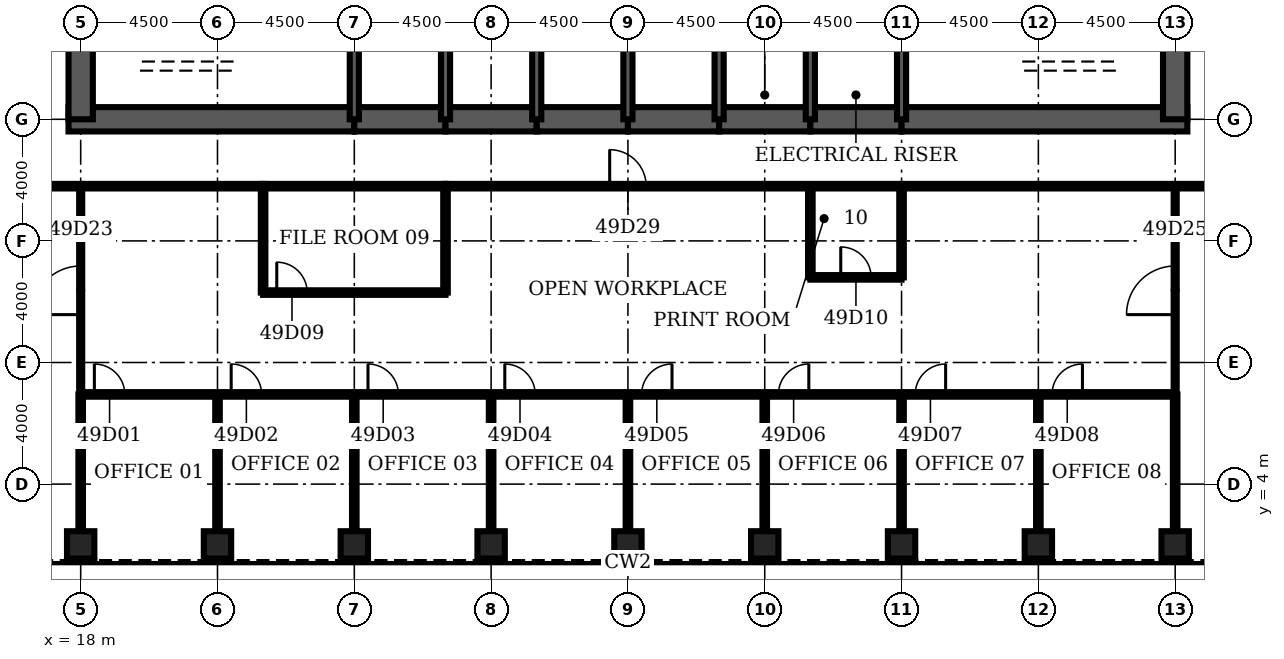
"""IFC4 building model, lengths in metres.
Left out: names, types, materials, properties, quantities, classifications, styles, units other than length and angle.
Written with IfcOpenShell. Run it as: python <this file> out.ifc"""

import sys

from ifc_helpers import new_model, si_unit, direction, frame, frame_2d, origin, origin_2d, place, context, subcontext, project, spatial, rectangle, hollow_rectangle, extrude, element, fill, save


model = new_model("IFC4")
c1 = context("Model", 3, precision=1e-05, world=origin(), true_north=direction((0.0, 1.0)))
c2 = subcontext(c1, "Body", "Model", "MODEL_VIEW")
j1 = project(units=[si_unit("LENGTHUNIT", "METRE"), si_unit("PLANEANGLEUNIT", "RADIAN")], contexts=[c1])
p1 = place(None, origin())
s1 = spatial("IfcSite", under=j1, at=p1, CompositionType="ELEMENT")
p2 = place(p1, origin())
s2 = spatial("IfcBuilding", under=s1, at=p2, CompositionType="ELEMENT")
p3 = place(p2, frame((0.0, 0.0, 219.4)))
s3 = spatial("IfcBuildingStorey", under=s2, at=p3, CompositionType="ELEMENT", Elevation=219.4)
for number, where, z_axis, x_axis in (
    (1, (18.0, 2.0, 0.0), (0.0, 0.0, 1.0), (0.0, 1.0, 0.0)),
    (2, (22.5, 2.0, 0.0), (0.0, 0.0, 1.0), (0.0, 1.0, 0.0)),
    (3, (27.0, 2.0, 0.0), (0.0, 0.0, 1.0), (0.0, 1.0, 0.0)),
    (4, (31.5, 2.0, 0.0), (0.0, 0.0, 1.0), (0.0, 1.0, 0.0)),
    (5, (36.0, 2.0, 0.0), (0.0, 0.0, 1.0), (0.0, 1.0, 0.0)),
    (6, (40.5, 2.0, 0.0), (0.0, 0.0, 1.0), (0.0, 1.0, 0.0)),
    (7, (45.0, 2.0, 0.0), (0.0, 0.0, 1.0), (0.0, 1.0, 0.0)),
    (8, (49.5, 2.0, 0.0), (0.0, 0.0, 1.0), (0.0, 1.0, 0.0)),
    (9, (54.0, 2.0, 0.0), (0.0, 0.0, 1.0), (0.0, 1.0, 0.0)),
):
    element("IfcColumn", number, at=place(p3, frame(where, z_axis=z_axis, x_axis=x_axis)), inside=s3, PredefinedType="COLUMN", context=c2, shape_type="SweptSolid", body=[
        extrude(hollow_rectangle(XDim=0.9, YDim=0.9, WallThickness=0.08, at=origin_2d()), origin(), (0.0, 0.0, 1.0), 4.2),
    ])
p4 = place(p3, frame((17.6, 16.0, 0.0), z_axis=(0.0, 0.0, 1.0), x_axis=(1.0, 0.0, 0.0)))
e10 = element("IfcWall", 10, at=p4, inside=s3, PredefinedType="SHEAR", context=c2, shape_type="SweptSolid", body=[
    extrude(rectangle(XDim=9.4, YDim=0.8, at=frame_2d((4.7, 0.0))), origin(), (0.0, 0.0, 1.0), 4.2),
])
for number, where, z_axis, x_axis in (
    (11, (27.0, 16.0, 0.0), (0.0, 0.0, 1.0), (1.0, 0.0, 0.0)),
    (12, (30.0, 16.0, 0.0), (0.0, 0.0, 1.0), (1.0, 0.0, 0.0)),
    (13, (33.0, 16.0, 0.0), (0.0, 0.0, 1.0), (1.0, 0.0, 0.0)),
    (14, (36.0, 16.0, 0.0), (0.0, 0.0, 1.0), (1.0, 0.0, 0.0)),
    (15, (39.0, 16.0, 0.0), (0.0, 0.0, 1.0), (1.0, 0.0, 0.0)),
    (16, (42.0, 16.0, 0.0), (0.0, 0.0, 1.0), (1.0, 0.0, 0.0)),
):
    element("IfcWall", number, at=place(p3, frame(where, z_axis=z_axis, x_axis=x_axis)), inside=s3, PredefinedType="SHEAR", context=c2, shape_type="SweptSolid", body=[
        extrude(rectangle(XDim=3.0, YDim=0.8, at=frame_2d((1.5, 0.0))), origin(), (0.0, 0.0, 1.0), 4.2),
    ])
p5 = place(p3, frame((45.0, 16.0, 0.0), z_axis=(0.0, 0.0, 1.0), x_axis=(1.0, 0.0, 0.0)))
e17 = element("IfcWall", 17, at=p5, inside=s3, PredefinedType="SHEAR", context=c2, shape_type="SweptSolid", body=[
    extrude(rectangle(XDim=9.4, YDim=0.8, at=frame_2d((4.7, 0.0))), origin(), (0.0, 0.0, 1.0), 4.2),
])
for number, where, z_axis, x_axis in (
    (18, (18.0, 19.2, 0.0), (0.0, 0.0, 1.0), (0.0, -1.0, 0.0)),
    (19, (54.0, 16.0, 0.0), (0.0, 0.0, 1.0), (0.0, 1.0, 0.0)),
):
    element("IfcWall", number, at=place(p3, frame(where, z_axis=z_axis, x_axis=x_axis)), inside=s3, PredefinedType="SHEAR", context=c2, shape_type="SweptSolid", body=[
        extrude(rectangle(XDim=3.2, YDim=0.8, at=frame_2d((1.6, 0.0))), origin(), (0.0, 0.0, 1.0), 4.2),
    ])
for number, where, z_axis, x_axis in (
    (20, (27.0, 16.0, 0.0), (0.0, 0.0, 1.0), (0.0, 1.0, 0.0)),
    (21, (30.0, 16.0, 0.0), (0.0, 0.0, 1.0), (0.0, 1.0, 0.0)),
    (22, (33.0, 16.0, 0.0), (0.0, 0.0, 1.0), (0.0, 1.0, 0.0)),
    (23, (36.0, 16.0, 0.0), (0.0, 0.0, 1.0), (0.0, 1.0, 0.0)),
    (24, (39.0, 16.0, 0.0), (0.0, 0.0, 1.0), (0.0, 1.0, 0.0)),
    (25, (42.0, 16.0, 0.0), (0.0, 0.0, 1.0), (0.0, 1.0, 0.0)),
    (26, (45.0, 16.0, 0.0), (0.0, 0.0, 1.0), (0.0, 1.0, 0.0)),
):
    element("IfcWall", number, at=place(p3, frame(where, z_axis=z_axis, x_axis=x_axis)), inside=s3, PredefinedType="SOLIDWALL", context=c2, shape_type="SweptSolid", body=[
        extrude(rectangle(XDim=3.2, YDim=0.3, at=frame_2d((1.6, 0.0))), origin(), (0.0, 0.0, 1.0), 4.2),
    ])
p6 = place(p3, frame((39.15, 17.35, 0.0), z_axis=(0.0, 0.0, 1.0), x_axis=(1.0, 0.0, 0.0)))
e27 = element("IfcWall", 27, at=p6, inside=s3, PredefinedType="SOLIDWALL", context=c2, shape_type="SweptSolid", body=[
    extrude(rectangle(XDim=2.7, YDim=0.3, at=frame_2d((1.35, 0.0))), origin(), (0.0, 0.0, 1.0), 4.04),
])
p7 = place(p6, frame((0.85, 0.0, 0.0)))
e28 = element("IfcOpeningElement", 28, at=p7, cuts=e27, PredefinedType="OPENING", context=c2, shape_type="SweptSolid", body=[
    extrude(rectangle(XDim=1.0, YDim=2.1, at=frame_2d((0.5, 1.05))), frame((0.0, 0.16, 0.0), z_axis=(0.0, -1.0, 0.0), x_axis=(1.0, 0.0, 0.0)), (0.0, 0.0, 1.0), 0.32),
])
p8 = place(p3, frame((42.15, 17.35, 0.0), z_axis=(0.0, 0.0, 1.0), x_axis=(1.0, 0.0, 0.0)))
e29 = element("IfcWall", 29, at=p8, inside=s3, PredefinedType="SOLIDWALL", context=c2, shape_type="SweptSolid", body=[
    extrude(rectangle(XDim=2.7, YDim=0.3, at=frame_2d((1.35, 0.0))), origin(), (0.0, 0.0, 1.0), 4.04),
])
p9 = place(p8, frame((0.85, 0.0, 0.0)))
e30 = element("IfcOpeningElement", 30, at=p9, cuts=e29, PredefinedType="OPENING", context=c2, shape_type="SweptSolid", body=[
    extrude(rectangle(XDim=1.0, YDim=2.1, at=frame_2d((0.5, 1.05))), frame((0.0, 0.16, 0.0), z_axis=(0.0, -1.0, 0.0), x_axis=(1.0, 0.0, 0.0)), (0.0, 0.0, 1.0), 0.32),
])
p10 = place(p3, frame((18.0, 6.95, 0.0), z_axis=(0.0, 0.0, 1.0), x_axis=(1.0, 0.0, 0.0)))
e31 = element("IfcWall", 31, at=p10, inside=s3, PredefinedType="PARTITIONING", context=c2, shape_type="SweptSolid", body=[
    extrude(rectangle(XDim=36.0, YDim=0.15, at=frame_2d((18.0, 0.0))), origin(), (0.0, 0.0, 1.0), 3.0),
])
p11 = place(p10, frame((0.45, 0.0, 0.0)))
e32 = element("IfcOpeningElement", 32, at=p11, cuts=e31, PredefinedType="OPENING", context=c2, shape_type="SweptSolid", body=[
    extrude(rectangle(XDim=1.0, YDim=2.1, at=frame_2d((0.5, 1.05))), frame((0.0, 0.085, 0.0), z_axis=(0.0, -1.0, 0.0), x_axis=(1.0, 0.0, 0.0)), (0.0, 0.0, 1.0), 0.17),
])
p12 = place(p10, frame((4.95, 0.0, 0.0)))
e33 = element("IfcOpeningElement", 33, at=p12, cuts=e31, PredefinedType="OPENING", context=c2, shape_type="SweptSolid", body=[
    extrude(rectangle(XDim=1.0, YDim=2.1, at=frame_2d((0.5, 1.05))), frame((0.0, 0.085, 0.0), z_axis=(0.0, -1.0, 0.0), x_axis=(1.0, 0.0, 0.0)), (0.0, 0.0, 1.0), 0.17),
])
p13 = place(p10, frame((9.45, 0.0, 0.0)))
e34 = element("IfcOpeningElement", 34, at=p13, cuts=e31, PredefinedType="OPENING", context=c2, shape_type="SweptSolid", body=[
    extrude(rectangle(XDim=1.0, YDim=2.1, at=frame_2d((0.5, 1.05))), frame((0.0, 0.085, 0.0), z_axis=(0.0, -1.0, 0.0), x_axis=(1.0, 0.0, 0.0)), (0.0, 0.0, 1.0), 0.17),
])
p14 = place(p10, frame((13.95, 0.0, 0.0)))
e35 = element("IfcOpeningElement", 35, at=p14, cuts=e31, PredefinedType="OPENING", context=c2, shape_type="SweptSolid", body=[
    extrude(rectangle(XDim=1.0, YDim=2.1, at=frame_2d((0.5, 1.05))), frame((0.0, 0.085, 0.0), z_axis=(0.0, -1.0, 0.0), x_axis=(1.0, 0.0, 0.0)), (0.0, 0.0, 1.0), 0.17),
])
p15 = place(p10, frame((18.45, 0.0, 0.0)))
e36 = element("IfcOpeningElement", 36, at=p15, cuts=e31, PredefinedType="OPENING", context=c2, shape_type="SweptSolid", body=[
    extrude(rectangle(XDim=1.0, YDim=2.1, at=frame_2d((0.5, 1.05))), frame((0.0, 0.085, 0.0), z_axis=(0.0, -1.0, 0.0), x_axis=(1.0, 0.0, 0.0)), (0.0, 0.0, 1.0), 0.17),
])
p16 = place(p10, frame((22.95, 0.0, 0.0)))
e37 = element("IfcOpeningElement", 37, at=p16, cuts=e31, PredefinedType="OPENING", context=c2, shape_type="SweptSolid", body=[
    extrude(rectangle(XDim=1.0, YDim=2.1, at=frame_2d((0.5, 1.05))), frame((0.0, 0.085, 0.0), z_axis=(0.0, -1.0, 0.0), x_axis=(1.0, 0.0, 0.0)), (0.0, 0.0, 1.0), 0.17),
])
p17 = place(p10, frame((27.45, 0.0, 0.0)))
e38 = element("IfcOpeningElement", 38, at=p17, cuts=e31, PredefinedType="OPENING", context=c2, shape_type="SweptSolid", body=[
    extrude(rectangle(XDim=1.0, YDim=2.1, at=frame_2d((0.5, 1.05))), frame((0.0, 0.085, 0.0), z_axis=(0.0, -1.0, 0.0), x_axis=(1.0, 0.0, 0.0)), (0.0, 0.0, 1.0), 0.17),
])
p18 = place(p10, frame((31.95, 0.0, 0.0)))
e39 = element("IfcOpeningElement", 39, at=p18, cuts=e31, PredefinedType="OPENING", context=c2, shape_type="SweptSolid", body=[
    extrude(rectangle(XDim=1.0, YDim=2.1, at=frame_2d((0.5, 1.05))), frame((0.0, 0.085, 0.0), z_axis=(0.0, -1.0, 0.0), x_axis=(1.0, 0.0, 0.0)), (0.0, 0.0, 1.0), 0.17),
])
p19 = place(p3, frame((24.0, 10.3, 0.0), z_axis=(0.0, 0.0, 1.0), x_axis=(1.0, 0.0, 0.0)))
e40 = element("IfcWall", 40, at=p19, inside=s3, PredefinedType="PARTITIONING", context=c2, shape_type="SweptSolid", body=[
    extrude(rectangle(XDim=6.0, YDim=0.15, at=frame_2d((3.0, 0.0))), origin(), (0.0, 0.0, 1.0), 3.0),
])
p20 = place(p19, frame((0.45, 0.0, 0.0)))
e41 = element("IfcOpeningElement", 41, at=p20, cuts=e40, PredefinedType="OPENING", context=c2, shape_type="SweptSolid", body=[
    extrude(rectangle(XDim=1.0, YDim=2.1, at=frame_2d((0.5, 1.05))), frame((0.0, 0.085, 0.0), z_axis=(0.0, -1.0, 0.0), x_axis=(1.0, 0.0, 0.0)), (0.0, 0.0, 1.0), 0.17),
])
p21 = place(p3, frame((42.0, 10.8, 0.0), z_axis=(0.0, 0.0, 1.0), x_axis=(1.0, 0.0, 0.0)))
e42 = element("IfcWall", 42, at=p21, inside=s3, PredefinedType="PARTITIONING", context=c2, shape_type="SweptSolid", body=[
    extrude(rectangle(XDim=3.0, YDim=0.15, at=frame_2d((1.5, 0.0))), origin(), (0.0, 0.0, 1.0), 3.0),
])
p22 = place(p21, frame((1.0, 0.0, 0.0)))
e43 = element("IfcOpeningElement", 43, at=p22, cuts=e42, PredefinedType="OPENING", context=c2, shape_type="SweptSolid", body=[
    extrude(rectangle(XDim=1.0, YDim=2.1, at=frame_2d((0.5, 1.05))), frame((0.0, 0.085, 0.0), z_axis=(0.0, -1.0, 0.0), x_axis=(1.0, 0.0, 0.0)), (0.0, 0.0, 1.0), 0.17),
])
p23 = place(p3, frame((15.2, 13.8, 0.0), z_axis=(0.0, 0.0, 1.0), x_axis=(1.0, 0.0, 0.0)))
e44 = element("IfcWall", 44, at=p23, inside=s3, PredefinedType="PARTITIONING", context=c2, shape_type="SweptSolid", body=[
    extrude(rectangle(XDim=8.8, YDim=0.15, at=frame_2d((4.4, 0.0))), origin(), (0.0, 0.0, 1.0), 3.0),
])
p24 = place(p3, frame((24.0, 13.8, 0.0), z_axis=(0.0, 0.0, 1.0), x_axis=(1.0, 0.0, 0.0)))
e45 = element("IfcWall", 45, at=p24, inside=s3, PredefinedType="PARTITIONING", context=c2, shape_type="SweptSolid", body=[
    extrude(rectangle(XDim=6.0, YDim=0.15, at=frame_2d((3.0, 0.0))), origin(), (0.0, 0.0, 1.0), 3.0),
])
p25 = place(p3, frame((30.0, 13.8, 0.0), z_axis=(0.0, 0.0, 1.0), x_axis=(1.0, 0.0, 0.0)))
e46 = element("IfcWall", 46, at=p25, inside=s3, PredefinedType="PARTITIONING", context=c2, shape_type="SweptSolid", body=[
    extrude(rectangle(XDim=26.8, YDim=0.15, at=frame_2d((13.4, 0.0))), origin(), (0.0, 0.0, 1.0), 3.0),
])
p26 = place(p25, frame((5.4, 0.0, 0.0)))
e47 = element("IfcOpeningElement", 47, at=p26, cuts=e46, PredefinedType="OPENING", context=c2, shape_type="SweptSolid", body=[
    extrude(rectangle(XDim=1.2, YDim=2.1, at=frame_2d((0.6, 1.05))), frame((0.0, 0.085, 0.0), z_axis=(0.0, -1.0, 0.0), x_axis=(1.0, 0.0, 0.0)), (0.0, 0.0, 1.0), 0.17),
])
p27 = place(p3, frame((18.0, 2.45, 0.0), z_axis=(0.0, 0.0, 1.0), x_axis=(0.0, 1.0, 0.0)))
e48 = element("IfcWall", 48, at=p27, inside=s3, PredefinedType="PARTITIONING", context=c2, shape_type="SweptSolid", body=[
    extrude(rectangle(XDim=4.5, YDim=0.15, at=frame_2d((2.25, 0.0))), origin(), (0.0, 0.0, 1.0), 3.0),
])
p28 = place(p3, frame((18.0, 6.95, 0.0), z_axis=(0.0, 0.0, 1.0), x_axis=(0.0, 1.0, 0.0)))
e49 = element("IfcWall", 49, at=p28, inside=s3, PredefinedType="PARTITIONING", context=c2, shape_type="SweptSolid", body=[
    extrude(rectangle(XDim=6.85, YDim=0.1, at=frame_2d((3.425, 0.0))), origin(), (0.0, 0.0, 1.0), 3.0),
])
p29 = place(p28, frame((2.625, 0.0, 0.0)))
e50 = element("IfcOpeningElement", 50, at=p29, cuts=e49, PredefinedType="OPENING", context=c2, shape_type="SweptSolid", body=[
    extrude(rectangle(XDim=1.6, YDim=2.1, at=frame_2d((0.8, 1.05))), frame((0.0, 0.06, 0.0), z_axis=(0.0, -1.0, 0.0), x_axis=(1.0, 0.0, 0.0)), (0.0, 0.0, 1.0), 0.12),
])
p30 = place(p3, frame((22.5, 2.45, 0.0), z_axis=(0.0, 0.0, 1.0), x_axis=(0.0, 1.0, 0.0)))
e51 = element("IfcWall", 51, at=p30, inside=s3, PredefinedType="PARTITIONING", context=c2, shape_type="SweptSolid", body=[
    extrude(rectangle(XDim=4.5, YDim=0.15, at=frame_2d((2.25, 0.0))), origin(), (0.0, 0.0, 1.0), 3.0),
])
p31 = place(p3, frame((24.0, 10.3, 0.0), z_axis=(0.0, 0.0, 1.0), x_axis=(0.0, 1.0, 0.0)))
e52 = element("IfcWall", 52, at=p31, inside=s3, PredefinedType="PARTITIONING", context=c2, shape_type="SweptSolid", body=[
    extrude(rectangle(XDim=3.5, YDim=0.15, at=frame_2d((1.75, 0.0))), origin(), (0.0, 0.0, 1.0), 3.0),
])
p32 = place(p3, frame((27.0, 2.45, 0.0), z_axis=(0.0, 0.0, 1.0), x_axis=(0.0, 1.0, 0.0)))
e53 = element("IfcWall", 53, at=p32, inside=s3, PredefinedType="PARTITIONING", context=c2, shape_type="SweptSolid", body=[
    extrude(rectangle(XDim=4.5, YDim=0.15, at=frame_2d((2.25, 0.0))), origin(), (0.0, 0.0, 1.0), 3.0),
])
p33 = place(p3, frame((30.0, 10.3, 0.0), z_axis=(0.0, 0.0, 1.0), x_axis=(0.0, 1.0, 0.0)))
e54 = element("IfcWall", 54, at=p33, inside=s3, PredefinedType="PARTITIONING", context=c2, shape_type="SweptSolid", body=[
    extrude(rectangle(XDim=3.5, YDim=0.15, at=frame_2d((1.75, 0.0))), origin(), (0.0, 0.0, 1.0), 3.0),
])
for number, where, z_axis, x_axis in (
    (55, (31.5, 2.45, 0.0), (0.0, 0.0, 1.0), (0.0, 1.0, 0.0)),
    (56, (36.0, 2.45, 0.0), (0.0, 0.0, 1.0), (0.0, 1.0, 0.0)),
    (57, (40.5, 2.45, 0.0), (0.0, 0.0, 1.0), (0.0, 1.0, 0.0)),
):
    element("IfcWall", number, at=place(p3, frame(where, z_axis=z_axis, x_axis=x_axis)), inside=s3, PredefinedType="PARTITIONING", context=c2, shape_type="SweptSolid", body=[
        extrude(rectangle(XDim=4.5, YDim=0.15, at=frame_2d((2.25, 0.0))), origin(), (0.0, 0.0, 1.0), 3.0),
    ])
p34 = place(p3, frame((42.0, 10.8, 0.0), z_axis=(0.0, 0.0, 1.0), x_axis=(0.0, 1.0, 0.0)))
e58 = element("IfcWall", 58, at=p34, inside=s3, PredefinedType="PARTITIONING", context=c2, shape_type="SweptSolid", body=[
    extrude(rectangle(XDim=3.0, YDim=0.15, at=frame_2d((1.5, 0.0))), origin(), (0.0, 0.0, 1.0), 3.0),
])
p35 = place(p3, frame((45.0, 2.45, 0.0), z_axis=(0.0, 0.0, 1.0), x_axis=(0.0, 1.0, 0.0)))
e59 = element("IfcWall", 59, at=p35, inside=s3, PredefinedType="PARTITIONING", context=c2, shape_type="SweptSolid", body=[
    extrude(rectangle(XDim=4.5, YDim=0.15, at=frame_2d((2.25, 0.0))), origin(), (0.0, 0.0, 1.0), 3.0),
])
p36 = place(p3, frame((45.0, 10.8, 0.0), z_axis=(0.0, 0.0, 1.0), x_axis=(0.0, 1.0, 0.0)))
e60 = element("IfcWall", 60, at=p36, inside=s3, PredefinedType="PARTITIONING", context=c2, shape_type="SweptSolid", body=[
    extrude(rectangle(XDim=3.0, YDim=0.15, at=frame_2d((1.5, 0.0))), origin(), (0.0, 0.0, 1.0), 3.0),
])
for number, where, z_axis, x_axis in (
    (61, (49.5, 2.45, 0.0), (0.0, 0.0, 1.0), (0.0, 1.0, 0.0)),
    (62, (54.0, 2.45, 0.0), (0.0, 0.0, 1.0), (0.0, 1.0, 0.0)),
):
    element("IfcWall", number, at=place(p3, frame(where, z_axis=z_axis, x_axis=x_axis)), inside=s3, PredefinedType="PARTITIONING", context=c2, shape_type="SweptSolid", body=[
        extrude(rectangle(XDim=4.5, YDim=0.15, at=frame_2d((2.25, 0.0))), origin(), (0.0, 0.0, 1.0), 3.0),
    ])
p37 = place(p3, frame((54.0, 6.95, 0.0), z_axis=(0.0, 0.0, 1.0), x_axis=(0.0, 1.0, 0.0)))
e63 = element("IfcWall", 63, at=p37, inside=s3, PredefinedType="PARTITIONING", context=c2, shape_type="SweptSolid", body=[
    extrude(rectangle(XDim=6.85, YDim=0.1, at=frame_2d((3.425, 0.0))), origin(), (0.0, 0.0, 1.0), 3.0),
])
p38 = place(p37, frame((2.625, 0.0, 0.0)))
e64 = element("IfcOpeningElement", 64, at=p38, cuts=e63, PredefinedType="OPENING", context=c2, shape_type="SweptSolid", body=[
    extrude(rectangle(XDim=1.6, YDim=2.1, at=frame_2d((0.8, 1.05))), frame((0.0, 0.06, 0.0), z_axis=(0.0, -1.0, 0.0), x_axis=(1.0, 0.0, 0.0)), (0.0, 0.0, 1.0), 0.12),
])
p39 = place(p7, origin())
e65 = element("IfcDoor", 65, at=p39, inside=s3, OperationType="SINGLE_SWING_LEFT", PredefinedType="DOOR", context=c2, shape_type="SweptSolid", body=[
    extrude(rectangle(XDim=1.0, YDim=2.1, at=frame_2d((0.5, 1.05))), frame((0.0, 0.025, 0.0), z_axis=(0.0, -1.0, 0.0), x_axis=(1.0, 0.0, 0.0)), (0.0, 0.0, 1.0), 0.05),
])
fill(e28, e65)
p40 = place(p9, origin())
e66 = element("IfcDoor", 66, at=p40, inside=s3, OperationType="SINGLE_SWING_LEFT", PredefinedType="DOOR", context=c2, shape_type="SweptSolid", body=[
    extrude(rectangle(XDim=1.0, YDim=2.1, at=frame_2d((0.5, 1.05))), frame((0.0, 0.025, 0.0), z_axis=(0.0, -1.0, 0.0), x_axis=(1.0, 0.0, 0.0)), (0.0, 0.0, 1.0), 0.05),
])
fill(e30, e66)
p41 = place(p11, origin())
e67 = element("IfcDoor", 67, at=p41, inside=s3, OperationType="SINGLE_SWING_LEFT", PredefinedType="DOOR", context=c2, shape_type="SweptSolid", body=[
    extrude(rectangle(XDim=1.0, YDim=2.1, at=frame_2d((0.5, 1.05))), frame((0.0, 0.025, 0.0), z_axis=(0.0, -1.0, 0.0), x_axis=(1.0, 0.0, 0.0)), (0.0, 0.0, 1.0), 0.05),
])
fill(e32, e67)
p42 = place(p12, origin())
e68 = element("IfcDoor", 68, at=p42, inside=s3, OperationType="SINGLE_SWING_LEFT", PredefinedType="DOOR", context=c2, shape_type="SweptSolid", body=[
    extrude(rectangle(XDim=1.0, YDim=2.1, at=frame_2d((0.5, 1.05))), frame((0.0, 0.025, 0.0), z_axis=(0.0, -1.0, 0.0), x_axis=(1.0, 0.0, 0.0)), (0.0, 0.0, 1.0), 0.05),
])
fill(e33, e68)
p43 = place(p13, origin())
e69 = element("IfcDoor", 69, at=p43, inside=s3, OperationType="SINGLE_SWING_LEFT", PredefinedType="DOOR", context=c2, shape_type="SweptSolid", body=[
    extrude(rectangle(XDim=1.0, YDim=2.1, at=frame_2d((0.5, 1.05))), frame((0.0, 0.025, 0.0), z_axis=(0.0, -1.0, 0.0), x_axis=(1.0, 0.0, 0.0)), (0.0, 0.0, 1.0), 0.05),
])
fill(e34, e69)
p44 = place(p14, origin())
e70 = element("IfcDoor", 70, at=p44, inside=s3, OperationType="SINGLE_SWING_LEFT", PredefinedType="DOOR", context=c2, shape_type="SweptSolid", body=[
    extrude(rectangle(XDim=1.0, YDim=2.1, at=frame_2d((0.5, 1.05))), frame((0.0, 0.025, 0.0), z_axis=(0.0, -1.0, 0.0), x_axis=(1.0, 0.0, 0.0)), (0.0, 0.0, 1.0), 0.05),
])
fill(e35, e70)
p45 = place(p15, origin())
e71 = element("IfcDoor", 71, at=p45, inside=s3, OperationType="SINGLE_SWING_RIGHT", PredefinedType="DOOR", context=c2, shape_type="SweptSolid", body=[
    extrude(rectangle(XDim=1.0, YDim=2.1, at=frame_2d((0.5, 1.05))), frame((0.0, 0.025, 0.0), z_axis=(0.0, -1.0, 0.0), x_axis=(1.0, 0.0, 0.0)), (0.0, 0.0, 1.0), 0.05),
])
fill(e36, e71)
p46 = place(p16, origin())
e72 = element("IfcDoor", 72, at=p46, inside=s3, OperationType="SINGLE_SWING_RIGHT", PredefinedType="DOOR", context=c2, shape_type="SweptSolid", body=[
    extrude(rectangle(XDim=1.0, YDim=2.1, at=frame_2d((0.5, 1.05))), frame((0.0, 0.025, 0.0), z_axis=(0.0, -1.0, 0.0), x_axis=(1.0, 0.0, 0.0)), (0.0, 0.0, 1.0), 0.05),
])
fill(e37, e72)
p47 = place(p17, origin())
e73 = element("IfcDoor", 73, at=p47, inside=s3, OperationType="SINGLE_SWING_RIGHT", PredefinedType="DOOR", context=c2, shape_type="SweptSolid", body=[
    extrude(rectangle(XDim=1.0, YDim=2.1, at=frame_2d((0.5, 1.05))), frame((0.0, 0.025, 0.0), z_axis=(0.0, -1.0, 0.0), x_axis=(1.0, 0.0, 0.0)), (0.0, 0.0, 1.0), 0.05),
])
fill(e38, e73)
p48 = place(p18, origin())
e74 = element("IfcDoor", 74, at=p48, inside=s3, OperationType="SINGLE_SWING_RIGHT", PredefinedType="DOOR", context=c2, shape_type="SweptSolid", body=[
    extrude(rectangle(XDim=1.0, YDim=2.1, at=frame_2d((0.5, 1.05))), frame((0.0, 0.025, 0.0), z_axis=(0.0, -1.0, 0.0), x_axis=(1.0, 0.0, 0.0)), (0.0, 0.0, 1.0), 0.05),
])
fill(e39, e74)
p49 = place(p20, origin())
e75 = element("IfcDoor", 75, at=p49, inside=s3, OperationType="SINGLE_SWING_LEFT", PredefinedType="DOOR", context=c2, shape_type="SweptSolid", body=[
    extrude(rectangle(XDim=1.0, YDim=2.1, at=frame_2d((0.5, 1.05))), frame((0.0, 0.025, 0.0), z_axis=(0.0, -1.0, 0.0), x_axis=(1.0, 0.0, 0.0)), (0.0, 0.0, 1.0), 0.05),
])
fill(e41, e75)
p50 = place(p22, origin())
e76 = element("IfcDoor", 76, at=p50, inside=s3, OperationType="SINGLE_SWING_LEFT", PredefinedType="DOOR", context=c2, shape_type="SweptSolid", body=[
    extrude(rectangle(XDim=1.0, YDim=2.1, at=frame_2d((0.5, 1.05))), frame((0.0, 0.025, 0.0), z_axis=(0.0, -1.0, 0.0), x_axis=(1.0, 0.0, 0.0)), (0.0, 0.0, 1.0), 0.05),
])
fill(e43, e76)
p51 = place(p29, origin())
e77 = element("IfcDoor", 77, at=p51, inside=s3, OperationType="SINGLE_SWING_LEFT", PredefinedType="DOOR", context=c2, shape_type="SweptSolid", body=[
    extrude(rectangle(XDim=1.6, YDim=2.1, at=frame_2d((0.8, 1.05))), frame((0.0, 0.025, 0.0), z_axis=(0.0, -1.0, 0.0), x_axis=(1.0, 0.0, 0.0)), (0.0, 0.0, 1.0), 0.05),
])
fill(e50, e77)
p52 = place(p38, origin())
e78 = element("IfcDoor", 78, at=p52, inside=s3, OperationType="SINGLE_SWING_LEFT", PredefinedType="DOOR", context=c2, shape_type="SweptSolid", body=[
    extrude(rectangle(XDim=1.6, YDim=2.1, at=frame_2d((0.8, 1.05))), frame((0.0, 0.025, 0.0), z_axis=(0.0, -1.0, 0.0), x_axis=(1.0, 0.0, 0.0)), (0.0, 0.0, 1.0), 0.05),
])
fill(e64, e78)
p53 = place(p26, origin())
e79 = element("IfcDoor", 79, at=p53, inside=s3, OperationType="SINGLE_SWING_LEFT", PredefinedType="DOOR", context=c2, shape_type="SweptSolid", body=[
    extrude(rectangle(XDim=1.2, YDim=2.1, at=frame_2d((0.6, 1.05))), frame((0.0, 0.025, 0.0), z_axis=(0.0, -1.0, 0.0), x_axis=(1.0, 0.0, 0.0)), (0.0, 0.0, 1.0), 0.05),
])
fill(e47, e79)
save(model, sys.argv[1])
